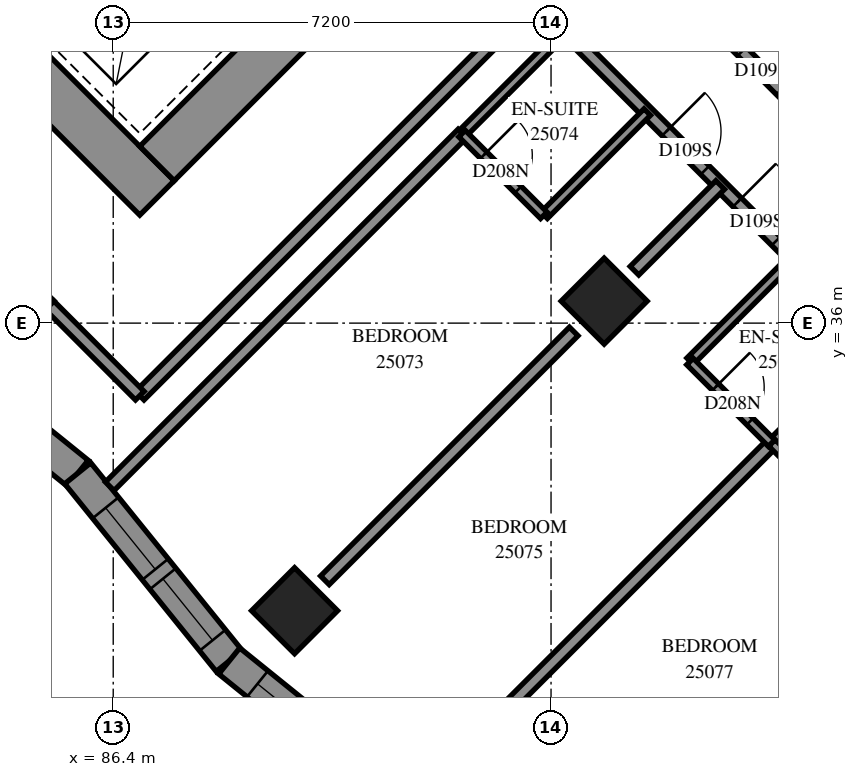
"""IFC4 building model, lengths in metres.
Left out: names, types, materials, properties, quantities, classifications, styles, units other than length and angle.
Written with IfcOpenShell. Run it as: python <this file> out.ifc"""

import sys

from ifc_helpers import new_model, si_unit, direction, frame, frame_2d, origin, origin_2d, place, context, subcontext, project, spatial, polyline, rectangle, outline, extrude, element, fill, save


model = new_model("IFC4")
c1 = context("Model", 3, precision=1e-05, world=origin(), true_north=direction((0.0, 1.0)))
c2 = subcontext(c1, "Body", "Model", "MODEL_VIEW")
j1 = project(units=[si_unit("LENGTHUNIT", "METRE"), si_unit("PLANEANGLEUNIT", "RADIAN")], contexts=[c1])
p1 = place(None, origin())
s1 = spatial("IfcSite", under=j1, at=p1, CompositionType="ELEMENT")
p2 = place(p1, origin())
s2 = spatial("IfcBuilding", under=s1, at=p2, CompositionType="ELEMENT")
p3 = place(p2, frame((0.0, 0.0, 94.8)))
s3 = spatial("IfcBuildingStorey", under=s2, at=p3, CompositionType="ELEMENT", Elevation=94.8)
for number, where, z_axis, x_axis in (
    (1, (94.474, 36.362, 0.0), (0.0, 0.0, 1.0), (0.707, -0.707, 0.0)),
    (2, (89.382, 31.271, 0.0), (0.0, 0.0, 1.0), (0.707, -0.707, 0.0)),
):
    element("IfcColumn", number, at=place(p3, frame(where, z_axis=z_axis, x_axis=x_axis)), inside=s3, PredefinedType="COLUMN", context=c2, shape_type="SweptSolid", body=[
        extrude(rectangle(XDim=1.0, YDim=1.0, at=origin_2d()), origin(), (0.0, 0.0, 1.0), 3.1),
    ])
p4 = place(p3, frame((75.806, 49.373, -0.3), z_axis=(0.0, 0.0, 1.0), x_axis=(0.7071067812, -0.7071067812, 0.0)))
e3 = element("IfcWall", 3, at=p4, inside=s3, PredefinedType="SHEAR", context=c2, shape_type="SweptSolid", body=[
    extrude(rectangle(XDim=16.0, YDim=0.8, at=frame_2d((8.0, 0.0))), origin(), (0.0, 0.0, 1.0), 2.7),
])
p5 = place(p3, frame((87.12, 38.625, -0.3), z_axis=(0.0, 0.0, 1.0), x_axis=(0.7071067812, 0.7071067812, 0.0)))
e4 = element("IfcWall", 4, at=p5, inside=s3, PredefinedType="SHEAR", context=c2, shape_type="SweptSolid", body=[
    extrude(rectangle(XDim=14.4, YDim=0.8, at=frame_2d((7.2, 0.0))), origin(), (0.0, 0.0, 1.0), 2.7),
])
p6 = place(p5, frame((4.55, 0.0, 0.3)))
e5 = element("IfcOpeningElement", 5, at=p6, cuts=e4, PredefinedType="OPENING", context=c2, shape_type="SweptSolid", body=[
    extrude(rectangle(XDim=1.1, YDim=2.1, at=frame_2d((0.55, 1.05))), frame((0.0, 0.41, 0.0), z_axis=(0.0, -1.0, 0.0), x_axis=(1.0, 0.0, 0.0)), (0.0, 0.0, 1.0), 0.82),
])
p7 = place(p5, frame((11.35, 0.0, 0.3)))
e6 = element("IfcOpeningElement", 6, at=p7, cuts=e4, PredefinedType="OPENING", context=c2, shape_type="SweptSolid", body=[
    extrude(rectangle(XDim=1.1, YDim=2.1, at=frame_2d((0.55, 1.05))), frame((0.0, 0.41, 0.0), z_axis=(0.0, -1.0, 0.0), x_axis=(1.0, 0.0, 0.0)), (0.0, 0.0, 1.0), 0.82),
])
p8 = place(p3, frame((82.73, 36.021, 0.0), z_axis=(0.0, 0.0, 1.0), x_axis=(0.7781804948, -0.6280406974, 0.0)))
e7 = element("IfcWall", 7, at=p8, inside=s3, PredefinedType="SOLIDWALL", context=c2, shape_type="SweptSolid", body=[
    extrude(outline(polyline([(-0.029, -0.275), (3.937, -0.275), (3.996, 0.275), (0.029, 0.275), (-0.029, -0.275)])), origin(), (0.0, 0.0, 1.0), 3.1),
])
p9 = place(p8, frame((1.717, 0.0, 0.5)))
e8 = element("IfcOpeningElement", 8, at=p9, cuts=e7, PredefinedType="OPENING", context=c2, shape_type="SweptSolid", body=[
    extrude(rectangle(XDim=1.2, YDim=2.45, at=frame_2d((0.6, 1.225))), frame((0.0, 0.285, 0.0), z_axis=(0.0, -1.0, 0.0), x_axis=(1.0, 0.0, 0.0)), (0.0, 0.0, 1.0), 0.57),
])
p10 = place(p3, frame((85.817, 33.53, 0.0), z_axis=(0.0, 0.0, 1.0), x_axis=(0.6280530196, -0.7781705498, 0.0)))
e9 = element("IfcWall", 9, at=p10, inside=s3, PredefinedType="SOLIDWALL", context=c2, shape_type="SweptSolid", body=[
    extrude(outline(polyline([(0.029, -0.275), (3.996, -0.275), (3.937, 0.275), (-0.029, 0.275), (0.029, -0.275)])), origin(), (0.0, 0.0, 1.0), 3.1),
])
p11 = place(p10, frame((0.73, 0.0, 0.5)))
e10 = element("IfcOpeningElement", 10, at=p11, cuts=e9, PredefinedType="OPENING", context=c2, shape_type="SweptSolid", body=[
    extrude(rectangle(XDim=1.3, YDim=2.45, at=frame_2d((0.65, 1.225))), frame((0.0, 0.285, 0.0), z_axis=(0.0, -1.0, 0.0), x_axis=(1.0, 0.0, 0.0)), (0.0, 0.0, 1.0), 0.57),
])
p12 = place(p10, frame((2.229, 0.0, 0.5)))
e11 = element("IfcOpeningElement", 11, at=p12, cuts=e9, PredefinedType="OPENING", context=c2, shape_type="SweptSolid", body=[
    extrude(rectangle(XDim=1.3, YDim=2.45, at=frame_2d((0.65, 1.225))), frame((0.0, 0.285, 0.0), z_axis=(0.0, -1.0, 0.0), x_axis=(1.0, 0.0, 0.0)), (0.0, 0.0, 1.0), 0.57),
])
p13 = place(p3, frame((88.308, 30.444, 0.0), z_axis=(0.0, 0.0, 1.0), x_axis=(0.7781705498, -0.6280530196, 0.0)))
e12 = element("IfcWall", 12, at=p13, inside=s3, PredefinedType="SOLIDWALL", context=c2, shape_type="SweptSolid", body=[
    extrude(outline(polyline([(-0.029, -0.275), (3.937, -0.275), (3.996, 0.275), (0.029, 0.275), (-0.029, -0.275)])), origin(), (0.0, 0.0, 1.0), 3.1),
])
p14 = place(p13, frame((0.598, 0.0, 0.5)))
e13 = element("IfcOpeningElement", 13, at=p14, cuts=e12, PredefinedType="OPENING", context=c2, shape_type="SweptSolid", body=[
    extrude(rectangle(XDim=1.3, YDim=2.45, at=frame_2d((0.65, 1.225))), frame((0.0, 0.285, 0.0), z_axis=(0.0, -1.0, 0.0), x_axis=(1.0, 0.0, 0.0)), (0.0, 0.0, 1.0), 0.57),
])
p15 = place(p13, frame((2.098, 0.0, 0.5)))
e14 = element("IfcOpeningElement", 14, at=p15, cuts=e12, PredefinedType="OPENING", context=c2, shape_type="SweptSolid", body=[
    extrude(rectangle(XDim=1.3, YDim=2.45, at=frame_2d((0.65, 1.225))), frame((0.0, 0.285, 0.0), z_axis=(0.0, -1.0, 0.0), x_axis=(1.0, 0.0, 0.0)), (0.0, 0.0, 1.0), 0.57),
])
p16 = place(p3, frame((93.339, 41.309, 0.0), z_axis=(0.0, 0.0, 1.0), x_axis=(0.7071067812, -0.7071067812, 0.0)))
e15 = element("IfcWall", 15, at=p16, inside=s3, PredefinedType="PARTITIONING", context=c2, shape_type="SweptSolid", body=[
    extrude(rectangle(XDim=18.702, YDim=0.2, at=frame_2d((9.351, 0.0))), origin(), (0.0, 0.0, 1.0), 3.1),
])
p17 = place(p16, frame((3.05, 0.0, 0.0)))
e16 = element("IfcOpeningElement", 16, at=p17, cuts=e15, PredefinedType="OPENING", context=c2, shape_type="SweptSolid", body=[
    extrude(rectangle(XDim=0.9, YDim=2.1, at=frame_2d((0.45, 1.05))), frame((0.0, 0.11, 0.0), z_axis=(0.0, -1.0, 0.0), x_axis=(1.0, 0.0, 0.0)), (0.0, 0.0, 1.0), 0.22),
])
p18 = place(p16, frame((4.7, 0.0, 0.0)))
e17 = element("IfcOpeningElement", 17, at=p18, cuts=e15, PredefinedType="OPENING", context=c2, shape_type="SweptSolid", body=[
    extrude(rectangle(XDim=0.9, YDim=2.1, at=frame_2d((0.45, 1.05))), frame((0.0, 0.11, 0.0), z_axis=(0.0, -1.0, 0.0), x_axis=(1.0, 0.0, 0.0)), (0.0, 0.0, 1.0), 0.22),
])
p19 = place(p16, frame((10.149, 0.0, 0.0)))
e18 = element("IfcOpeningElement", 18, at=p19, cuts=e15, PredefinedType="OPENING", context=c2, shape_type="SweptSolid", body=[
    extrude(rectangle(XDim=0.9, YDim=2.1, at=frame_2d((0.45, 1.05))), frame((0.0, 0.11, 0.0), z_axis=(0.0, -1.0, 0.0), x_axis=(1.0, 0.0, 0.0)), (0.0, 0.0, 1.0), 0.22),
])
p20 = place(p16, frame((11.9, 0.0, 0.0)))
e19 = element("IfcOpeningElement", 19, at=p20, cuts=e15, PredefinedType="OPENING", context=c2, shape_type="SweptSolid", body=[
    extrude(rectangle(XDim=0.9, YDim=2.1, at=frame_2d((0.45, 1.05))), frame((0.0, 0.11, 0.0), z_axis=(0.0, -1.0, 0.0), x_axis=(1.0, 0.0, 0.0)), (0.0, 0.0, 1.0), 0.22),
])
p21 = place(p16, frame((17.45, 0.0, 0.0)))
e20 = element("IfcOpeningElement", 20, at=p21, cuts=e15, PredefinedType="OPENING", context=c2, shape_type="SweptSolid", body=[
    extrude(rectangle(XDim=0.9, YDim=2.1, at=frame_2d((0.45, 1.05))), frame((0.0, 0.11, 0.0), z_axis=(0.0, -1.0, 0.0), x_axis=(1.0, 0.0, 0.0)), (0.0, 0.0, 1.0), 0.22),
])
p22 = place(p3, frame((86.835, 34.806, 0.0), z_axis=(0.0, 0.0, 1.0), x_axis=(0.7071067812, 0.7071067812, 0.0)))
e21 = element("IfcWall", 21, at=p22, inside=s3, PredefinedType="PARTITIONING", context=c2, shape_type="SweptSolid", body=[
    extrude(rectangle(XDim=9.201, YDim=0.2, at=frame_2d((4.601, 0.0))), origin(), (0.0, 0.0, 1.0), 3.1),
])
p23 = place(p3, frame((86.343, 33.316, 0.0), z_axis=(0.0, 0.0, 1.0), x_axis=(0.7069848641, 0.7072286772, 0.0)))
e22 = element("IfcWall", 22, at=p23, inside=s3, PredefinedType="PARTITIONING", context=c2, shape_type="SweptSolid", body=[
    extrude(rectangle(XDim=8.203, YDim=0.2, at=frame_2d((4.101, 0.0))), origin(), (0.0, 0.0, 1.0), 3.1),
])
p24 = place(p3, frame((91.461, 28.253, 0.0), z_axis=(0.0, 0.0, 1.0), x_axis=(0.7072231255, 0.7069904178, 0.0)))
e23 = element("IfcWall", 23, at=p24, inside=s3, PredefinedType="PARTITIONING", context=c2, shape_type="SweptSolid", body=[
    extrude(rectangle(XDim=8.165, YDim=0.2, at=frame_2d((4.082, 0.0))), origin(), (0.0, 0.0, 1.0), 3.1),
])
p25 = place(p3, frame((94.62, 42.587, 0.0), z_axis=(0.0, 0.0, 1.0), x_axis=(0.7071067812, -0.7071067812, 0.0)))
e24 = element("IfcWall", 24, at=p25, inside=s3, PredefinedType="PARTITIONING", context=c2, shape_type="SweptSolid", body=[
    extrude(rectangle(XDim=7.9, YDim=0.2, at=frame_2d((3.95, 0.0))), origin(), (0.0, 0.0, 1.0), 3.1),
])
p26 = place(p25, frame((2.998, 0.0, 0.0)))
e25 = element("IfcOpeningElement", 25, at=p26, cuts=e24, PredefinedType="OPENING", context=c2, shape_type="SweptSolid", body=[
    extrude(rectangle(XDim=0.9, YDim=2.1, at=frame_2d((0.45, 1.05))), frame((0.0, 0.11, 0.0), z_axis=(0.0, -1.0, 0.0), x_axis=(1.0, 0.0, 0.0)), (0.0, 0.0, 1.0), 0.22),
])
p27 = place(p25, frame((4.649, 0.0, 0.0)))
e26 = element("IfcOpeningElement", 26, at=p27, cuts=e24, PredefinedType="OPENING", context=c2, shape_type="SweptSolid", body=[
    extrude(rectangle(XDim=0.9, YDim=2.1, at=frame_2d((0.45, 1.05))), frame((0.0, 0.11, 0.0), z_axis=(0.0, -1.0, 0.0), x_axis=(1.0, 0.0, 0.0)), (0.0, 0.0, 1.0), 0.22),
])
p28 = place(p3, frame((89.881, 31.771, 0.0), z_axis=(0.0, 0.0, 1.0), x_axis=(0.7071067812, 0.7071067812, 0.0)))
e27 = element("IfcWall", 27, at=p28, inside=s3, PredefinedType="PARTITIONING", context=c2, shape_type="SweptSolid", body=[
    extrude(rectangle(XDim=5.787, YDim=0.2, at=frame_2d((2.893, 0.0))), origin(), (0.0, 0.0, 1.0), 3.1),
])
p29 = place(p3, frame((94.973, 26.681, 0.0), z_axis=(0.0, 0.0, 1.0), x_axis=(0.7071067812, 0.7071067812, 0.0)))
e28 = element("IfcWall", 28, at=p29, inside=s3, PredefinedType="PARTITIONING", context=c2, shape_type="SweptSolid", body=[
    extrude(rectangle(XDim=5.784, YDim=0.2, at=frame_2d((2.892, 0.0))), origin(), (0.0, 0.0, 1.0), 3.1),
])
for number, where, z_axis, x_axis in (
    (29, (92.143, 39.117, 0.0), (0.0, 0.0, 1.0), (0.708, 0.707, 0.0)),
    (30, (93.487, 37.773, 0.0), (0.0, 0.0, 1.0), (0.707, 0.708, 0.0)),
    (31, (97.234, 34.026, 0.0), (0.0, 0.0, 1.0), (0.707, 0.708, 0.0)),
):
    element("IfcWall", number, at=place(p3, frame(where, z_axis=z_axis, x_axis=x_axis)), inside=s3, PredefinedType="PARTITIONING", context=c2, shape_type="SweptSolid", body=[
        extrude(rectangle(XDim=2.4, YDim=0.15, at=frame_2d((1.2, 0.0))), origin(), (0.0, 0.0, 1.0), 3.1),
    ])
p30 = place(p3, frame((95.887, 35.373, 0.0), z_axis=(0.0, 0.0, 1.0), x_axis=(0.7071067812, 0.7071067812, 0.0)))
e32 = element("IfcWall", 32, at=p30, inside=s3, PredefinedType="PARTITIONING", context=c2, shape_type="SweptSolid", body=[
    extrude(rectangle(XDim=2.398, YDim=0.15, at=frame_2d((1.199, 0.0))), origin(), (0.0, 0.0, 1.0), 3.1),
])
p31 = place(p3, frame((85.353, 36.293, 0.0), z_axis=(0.0, 0.0, 1.0), x_axis=(0.7066304548, -0.7075827869, 0.0)))
e33 = element("IfcWall", 33, at=p31, inside=s3, PredefinedType="PARTITIONING", context=c2, shape_type="SweptSolid", body=[
    extrude(rectangle(XDim=2.1, YDim=0.2, at=frame_2d((1.05, 0.0))), origin(), (0.0, 0.0, 1.0), 3.1),
])
p32 = place(p3, frame((94.972, 36.862, 0.0), z_axis=(0.0, 0.0, 1.0), x_axis=(0.7071067812, 0.7071067812, 0.0)))
e34 = element("IfcWall", 34, at=p32, inside=s3, PredefinedType="PARTITIONING", context=c2, shape_type="SweptSolid", body=[
    extrude(rectangle(XDim=1.994, YDim=0.2, at=frame_2d((0.997, 0.0))), origin(), (0.0, 0.0, 1.0), 3.1),
])
p33 = place(p3, frame((95.885, 35.369, 0.0), z_axis=(0.0, 0.0, 1.0), x_axis=(0.7071067812, -0.7071067812, 0.0)))
e35 = element("IfcWall", 35, at=p33, inside=s3, PredefinedType="PARTITIONING", context=c2, shape_type="SweptSolid", body=[
    extrude(rectangle(XDim=1.901, YDim=0.15, at=frame_2d((0.95, 0.0))), origin(), (0.0, 0.0, 1.0), 3.1),
])
p34 = place(p33, frame((0.595, 0.0, 0.0)))
e36 = element("IfcOpeningElement", 36, at=p34, cuts=e35, PredefinedType="OPENING", context=c2, shape_type="SweptSolid", body=[
    extrude(rectangle(XDim=0.8, YDim=2.1, at=frame_2d((0.4, 1.05))), frame((0.0, 0.085, 0.0), z_axis=(0.0, -1.0, 0.0), x_axis=(1.0, 0.0, 0.0)), (0.0, 0.0, 1.0), 0.17),
])
p35 = place(p3, frame((92.137, 39.117, 0.0), z_axis=(0.0, 0.0, 1.0), x_axis=(0.7071067812, -0.7071067812, 0.0)))
e37 = element("IfcWall", 37, at=p35, inside=s3, PredefinedType="PARTITIONING", context=c2, shape_type="SweptSolid", body=[
    extrude(rectangle(XDim=1.901, YDim=0.15, at=frame_2d((0.95, 0.0))), origin(), (0.0, 0.0, 1.0), 3.1),
])
p36 = place(p35, frame((0.502, 0.0, 0.0)))
e38 = element("IfcOpeningElement", 38, at=p36, cuts=e37, PredefinedType="OPENING", context=c2, shape_type="SweptSolid", body=[
    extrude(rectangle(XDim=0.8, YDim=2.1, at=frame_2d((0.4, 1.05))), frame((0.0, 0.085, 0.0), z_axis=(0.0, -1.0, 0.0), x_axis=(1.0, 0.0, 0.0)), (0.0, 0.0, 1.0), 0.17),
])
p37 = place(p3, frame((97.233, 34.029, 0.0), z_axis=(0.0, 0.0, 1.0), x_axis=(0.7065800724, -0.7076330979, 0.0)))
e39 = element("IfcWall", 39, at=p37, inside=s3, PredefinedType="PARTITIONING", context=c2, shape_type="SweptSolid", body=[
    extrude(rectangle(XDim=1.899, YDim=0.15, at=frame_2d((0.95, 0.0))), origin(), (0.0, 0.0, 1.0), 3.1),
])
p38 = place(p37, frame((0.515, 0.0, 0.0)))
e40 = element("IfcOpeningElement", 40, at=p38, cuts=e39, PredefinedType="OPENING", context=c2, shape_type="SweptSolid", body=[
    extrude(rectangle(XDim=0.8, YDim=2.1, at=frame_2d((0.4, 1.05))), frame((0.0, 0.085, 0.0), z_axis=(0.0, -1.0, 0.0), x_axis=(1.0, 0.0, 0.0)), (0.0, 0.0, 1.0), 0.17),
])
p39 = place(p3, frame((84.795, 36.855, 0.0), z_axis=(0.0, 0.0, 1.0), x_axis=(0.7071067812, -0.7071067812, 0.0)))
e41 = element("IfcWall", 41, at=p39, inside=s3, PredefinedType="PARTITIONING", context=c2, shape_type="SweptSolid", body=[
    extrude(rectangle(XDim=0.792, YDim=0.2, at=frame_2d((0.396, 0.0))), origin(), (0.0, 0.0, 1.0), 3.1),
])
p40 = place(p11, origin())
e42 = element("IfcWindow", 42, at=p40, inside=s3, PartitioningType="SINGLE_PANEL", PredefinedType="WINDOW", context=c2, shape_type="SweptSolid", body=[
    extrude(rectangle(XDim=1.3, YDim=2.45, at=frame_2d((0.65, 1.225))), frame((0.0, 0.155, 0.0), z_axis=(0.0, -1.0, 0.0), x_axis=(1.0, 0.0, 0.0)), (0.0, 0.0, 1.0), 0.06),
])
fill(e10, e42)
p41 = place(p12, origin())
e43 = element("IfcWindow", 43, at=p41, inside=s3, PartitioningType="SINGLE_PANEL", PredefinedType="WINDOW", context=c2, shape_type="SweptSolid", body=[
    extrude(rectangle(XDim=1.3, YDim=2.45, at=frame_2d((0.65, 1.225))), frame((0.0, 0.155, 0.0), z_axis=(0.0, -1.0, 0.0), x_axis=(1.0, 0.0, 0.0)), (0.0, 0.0, 1.0), 0.06),
])
fill(e11, e43)
p42 = place(p14, origin())
e44 = element("IfcWindow", 44, at=p42, inside=s3, PartitioningType="SINGLE_PANEL", PredefinedType="WINDOW", context=c2, shape_type="SweptSolid", body=[
    extrude(rectangle(XDim=1.3, YDim=2.45, at=frame_2d((0.65, 1.225))), frame((0.0, 0.155, 0.0), z_axis=(0.0, -1.0, 0.0), x_axis=(1.0, 0.0, 0.0)), (0.0, 0.0, 1.0), 0.06),
])
fill(e13, e44)
p43 = place(p26, origin())
e45 = element("IfcDoor", 45, at=p43, inside=s3, OperationType="SINGLE_SWING_RIGHT", PredefinedType="DOOR", context=c2, shape_type="SweptSolid", body=[
    extrude(rectangle(XDim=0.9, YDim=2.1, at=frame_2d((0.45, 1.05))), frame((0.0, 0.025, 0.0), z_axis=(0.0, -1.0, 0.0), x_axis=(1.0, 0.0, 0.0)), (0.0, 0.0, 1.0), 0.05),
])
fill(e25, e45)
p44 = place(p17, origin())
e46 = element("IfcDoor", 46, at=p44, inside=s3, OperationType="SINGLE_SWING_LEFT", PredefinedType="DOOR", context=c2, shape_type="SweptSolid", body=[
    extrude(rectangle(XDim=0.9, YDim=2.1, at=frame_2d((0.45, 1.05))), frame((0.0, 0.025, 0.0), z_axis=(0.0, -1.0, 0.0), x_axis=(1.0, 0.0, 0.0)), (0.0, 0.0, 1.0), 0.05),
])
fill(e16, e46)
p45 = place(p36, origin())
e47 = element("IfcDoor", 47, at=p45, inside=s3, OperationType="SINGLE_SWING_RIGHT", PredefinedType="DOOR", context=c2, shape_type="SweptSolid", body=[
    extrude(rectangle(XDim=0.8, YDim=2.1, at=frame_2d((0.4, 1.05))), frame((0.0, 0.025, 0.0), z_axis=(0.0, -1.0, 0.0), x_axis=(1.0, 0.0, 0.0)), (0.0, 0.0, 1.0), 0.05),
])
fill(e38, e47)
p46 = place(p18, origin())
e48 = element("IfcDoor", 48, at=p46, inside=s3, OperationType="SINGLE_SWING_RIGHT", PredefinedType="DOOR", context=c2, shape_type="SweptSolid", body=[
    extrude(rectangle(XDim=0.9, YDim=2.1, at=frame_2d((0.45, 1.05))), frame((0.0, 0.025, 0.0), z_axis=(0.0, -1.0, 0.0), x_axis=(1.0, 0.0, 0.0)), (0.0, 0.0, 1.0), 0.05),
])
fill(e17, e48)
p47 = place(p34, origin())
e49 = element("IfcDoor", 49, at=p47, inside=s3, OperationType="SINGLE_SWING_RIGHT", PredefinedType="DOOR", context=c2, shape_type="SweptSolid", body=[
    extrude(rectangle(XDim=0.8, YDim=2.1, at=frame_2d((0.4, 1.05))), frame((0.0, 0.025, 0.0), z_axis=(0.0, -1.0, 0.0), x_axis=(1.0, 0.0, 0.0)), (0.0, 0.0, 1.0), 0.05),
])
fill(e36, e49)
save(model, sys.argv[1])
